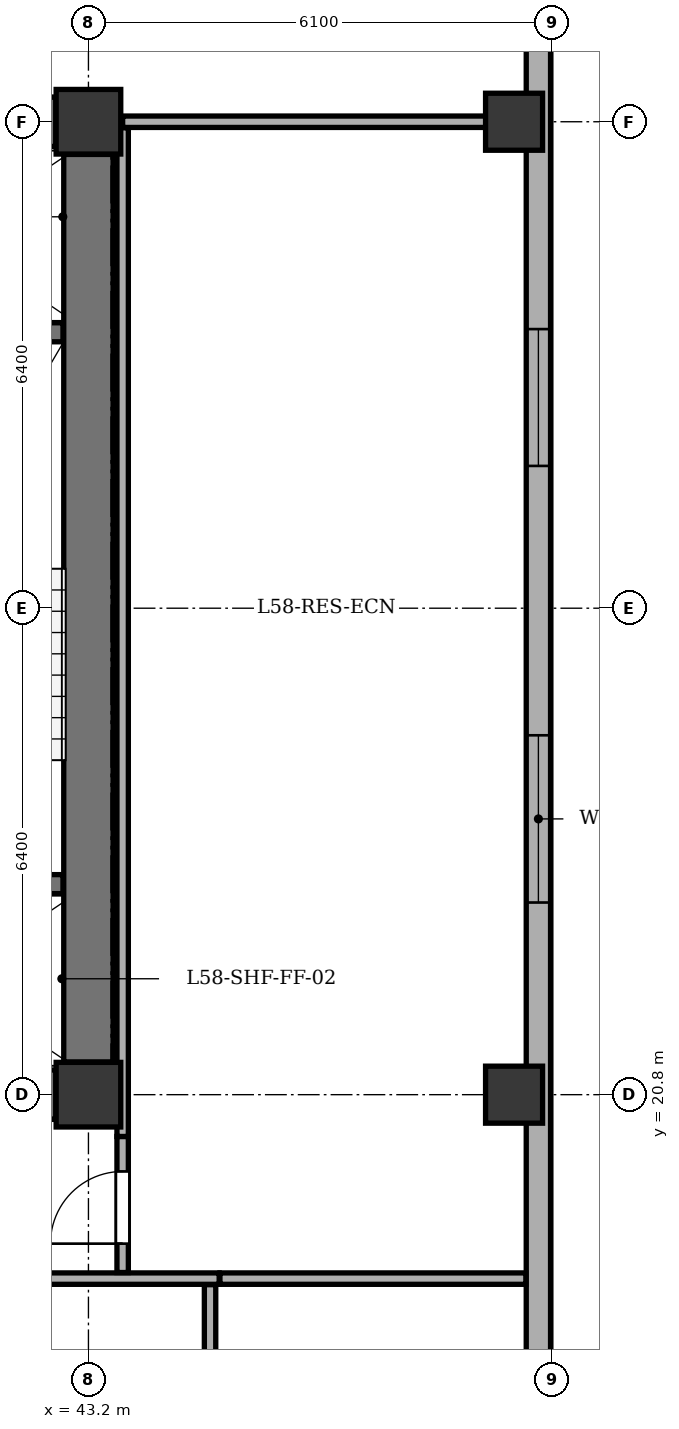
"""IFC4 building model, lengths in metres.
Left out: names, types, materials, properties, quantities, classifications, styles, units other than length and angle.
Written with IfcOpenShell. Run it as: python <this file> out.ifc"""

import sys

from ifc_helpers import new_model, si_unit, direction, frame, frame_2d, origin, origin_2d, place, context, subcontext, project, spatial, rectangle, extrude, element, fill, save


model = new_model("IFC4")
c1 = context("Model", 3, precision=1e-05, world=origin(), true_north=direction((0.0, 1.0)))
c2 = subcontext(c1, "Body", "Model", "MODEL_VIEW")
j1 = project(units=[si_unit("LENGTHUNIT", "METRE"), si_unit("PLANEANGLEUNIT", "RADIAN")], contexts=[c1])
p1 = place(None, origin())
s1 = spatial("IfcSite", under=j1, at=p1, CompositionType="ELEMENT")
p2 = place(p1, origin())
s2 = spatial("IfcBuilding", under=s1, at=p2, CompositionType="ELEMENT")
p3 = place(p2, frame((0.0, 0.0, 224.5)))
s3 = spatial("IfcBuildingStorey", under=s2, at=p3, CompositionType="ELEMENT", Elevation=224.5)
for number, where, z_axis, x_axis in (
    (1, (43.2, 20.8, 0.0), (0.0, 0.0, 1.0), (1.0, 0.0, 0.0)),
    (2, (43.2, 33.6, 0.0), (0.0, 0.0, 1.0), (1.0, 0.0, 0.0)),
):
    element("IfcColumn", number, at=place(p3, frame(where, z_axis=z_axis, x_axis=x_axis)), inside=s3, PredefinedType="COLUMN", context=c2, shape_type="SweptSolid", body=[
        extrude(rectangle(XDim=0.85, YDim=0.85, at=origin_2d()), origin(), (0.0, 0.0, 1.0), 3.4),
    ])
for number, where, z_axis, x_axis in (
    (3, (48.8, 20.8, 0.0), (0.0, 0.0, 1.0), (1.0, 0.0, 0.0)),
    (4, (48.8, 33.6, 0.0), (0.0, 0.0, 1.0), (1.0, 0.0, 0.0)),
):
    element("IfcColumn", number, at=place(p3, frame(where, z_axis=z_axis, x_axis=x_axis)), inside=s3, PredefinedType="COLUMN", context=c2, shape_type="SweptSolid", body=[
        extrude(rectangle(XDim=0.75, YDim=0.75, at=origin_2d()), origin(), (0.0, 0.0, 1.0), 3.4),
    ])
p4 = place(p3, frame((49.12, 35.0, 0.0), z_axis=(0.0, 0.0, 1.0), x_axis=(0.0, -1.0, 0.0)))
e5 = element("IfcWall", 5, at=p4, inside=s3, PredefinedType="STANDARD", context=c2, shape_type="SweptSolid", body=[
    extrude(rectangle(XDim=27.8, YDim=0.32, at=frame_2d((13.9, 0.0))), origin(), (0.0, 0.0, 1.0), 2.335),
])
p5 = place(p4, frame((4.128, 0.0, 0.75)))
e6 = element("IfcOpeningElement", 6, at=p5, cuts=e5, PredefinedType="OPENING", context=c2, shape_type="SweptSolid", body=[
    extrude(rectangle(XDim=1.8, YDim=1.465, at=frame_2d((0.9, 0.732))), frame((0.0, 0.17, 0.0), z_axis=(0.0, -1.0, 0.0), x_axis=(1.0, 0.0, 0.0)), (0.0, 0.0, 1.0), 0.34),
])
p6 = place(p4, frame((9.472, 0.0, 0.75)))
e7 = element("IfcOpeningElement", 7, at=p6, cuts=e5, PredefinedType="OPENING", context=c2, shape_type="SweptSolid", body=[
    extrude(rectangle(XDim=2.2, YDim=1.465, at=frame_2d((1.1, 0.732))), frame((0.0, 0.17, 0.0), z_axis=(0.0, -1.0, 0.0), x_axis=(1.0, 0.0, 0.0)), (0.0, 0.0, 1.0), 0.34),
])
p7 = place(p4, frame((18.815, 0.0, 0.75)))
e8 = element("IfcOpeningElement", 8, at=p7, cuts=e5, PredefinedType="OPENING", context=c2, shape_type="SweptSolid", body=[
    extrude(rectangle(XDim=1.8, YDim=1.465, at=frame_2d((0.9, 0.732))), frame((0.0, 0.17, 0.0), z_axis=(0.0, -1.0, 0.0), x_axis=(1.0, 0.0, 0.0)), (0.0, 0.0, 1.0), 0.34),
])
p8 = place(p4, frame((23.405, 0.0, 0.75)))
e9 = element("IfcOpeningElement", 9, at=p8, cuts=e5, PredefinedType="OPENING", context=c2, shape_type="SweptSolid", body=[
    extrude(rectangle(XDim=2.2, YDim=1.465, at=frame_2d((1.1, 0.732))), frame((0.0, 0.17, 0.0), z_axis=(0.0, -1.0, 0.0), x_axis=(1.0, 0.0, 0.0)), (0.0, 0.0, 1.0), 0.34),
])
p9 = place(p3, frame((43.2, 21.23, 0.0), z_axis=(0.0, 0.0, 1.0), x_axis=(0.0, 1.0, 0.0)))
e10 = element("IfcWall", 10, at=p9, inside=s3, PredefinedType="SHEAR", context=c2, shape_type="SweptSolid", body=[
    extrude(rectangle(XDim=11.94, YDim=0.65, at=frame_2d((5.97, 0.0))), origin(), (0.0, 0.0, 1.0), 2.95),
])
p10 = place(p3, frame((35.63, 20.8, 0.0), z_axis=(0.0, 0.0, 1.0), x_axis=(1.0, 0.0, 0.0)))
e11 = element("IfcWall", 11, at=p10, inside=s3, PredefinedType="SHEAR", context=c2, shape_type="SweptSolid", body=[
    extrude(rectangle(XDim=7.14, YDim=0.65, at=frame_2d((3.57, 0.0))), origin(), (0.0, 0.0, 1.0), 2.95),
])
p11 = place(p3, frame((35.63, 33.6, 0.0), z_axis=(0.0, 0.0, 1.0), x_axis=(1.0, 0.0, 0.0)))
e12 = element("IfcWall", 12, at=p11, inside=s3, PredefinedType="SHEAR", context=c2, shape_type="SweptSolid", body=[
    extrude(rectangle(XDim=7.14, YDim=0.65, at=frame_2d((3.57, 0.0))), origin(), (0.0, 0.0, 1.0), 2.95),
])
p12 = place(p11, frame((4.77, 0.0, 0.0)))
e13 = element("IfcOpeningElement", 13, at=p12, cuts=e12, PredefinedType="OPENING", context=c2, shape_type="SweptSolid", body=[
    extrude(rectangle(XDim=1.3, YDim=2.15, at=frame_2d((0.65, 1.075))), frame((0.0, 0.335, 0.0), z_axis=(0.0, -1.0, 0.0), x_axis=(1.0, 0.0, 0.0)), (0.0, 0.0, 1.0), 0.67),
])
p13 = place(p11, frame((2.57, 0.0, 0.0)))
e14 = element("IfcOpeningElement", 14, at=p13, cuts=e12, PredefinedType="OPENING", context=c2, shape_type="SweptSolid", body=[
    extrude(rectangle(XDim=0.85, YDim=2.02, at=frame_2d((0.425, 1.01))), frame((0.0, 0.335, 0.0), z_axis=(0.0, -1.0, 0.0), x_axis=(1.0, 0.0, 0.0)), (0.0, 0.0, 1.0), 0.67),
])
for number, where, z_axis, x_axis in (
    (15, (39.69, 23.57, 0.0), (0.0, 0.0, 1.0), (1.0, 0.0, 0.0)),
    (16, (39.69, 30.83, 0.0), (0.0, 0.0, 1.0), (1.0, 0.0, 0.0)),
):
    element("IfcWall", number, at=place(p3, frame(where, z_axis=z_axis, x_axis=x_axis)), inside=s3, PredefinedType="SHEAR", context=c2, shape_type="SweptSolid", body=[
        extrude(rectangle(XDim=3.175, YDim=0.25, at=frame_2d((1.587, 0.0))), origin(), (0.0, 0.0, 1.0), 2.95),
    ])
p14 = place(p3, frame((10.9, 18.38, 0.0), z_axis=(0.0, 0.0, 1.0), x_axis=(1.0, 0.0, 0.0)))
e17 = element("IfcWall", 17, at=p14, inside=s3, PredefinedType="PARTITIONING", context=c2, shape_type="SweptSolid", body=[
    extrude(rectangle(XDim=34.02, YDim=0.15, at=frame_2d((17.01, 0.0))), origin(), (0.0, 0.0, 1.0), 2.95),
])
p15 = place(p14, frame((2.774, 0.0, 0.0)))
e18 = element("IfcOpeningElement", 18, at=p15, cuts=e17, PredefinedType="OPENING", context=c2, shape_type="SweptSolid", body=[
    extrude(rectangle(XDim=1.0, YDim=2.1, at=frame_2d((0.5, 1.05))), frame((0.0, 0.085, 0.0), z_axis=(0.0, -1.0, 0.0), x_axis=(1.0, 0.0, 0.0)), (0.0, 0.0, 1.0), 0.17),
])
p16 = place(p14, frame((12.118, 0.0, 0.0)))
e19 = element("IfcOpeningElement", 19, at=p16, cuts=e17, PredefinedType="OPENING", context=c2, shape_type="SweptSolid", body=[
    extrude(rectangle(XDim=1.0, YDim=2.1, at=frame_2d((0.5, 1.05))), frame((0.0, 0.085, 0.0), z_axis=(0.0, -1.0, 0.0), x_axis=(1.0, 0.0, 0.0)), (0.0, 0.0, 1.0), 0.17),
])
p17 = place(p14, frame((20.901, 0.0, 0.0)))
e20 = element("IfcOpeningElement", 20, at=p17, cuts=e17, PredefinedType="OPENING", context=c2, shape_type="SweptSolid", body=[
    extrude(rectangle(XDim=1.0, YDim=2.1, at=frame_2d((0.5, 1.05))), frame((0.0, 0.085, 0.0), z_axis=(0.0, -1.0, 0.0), x_axis=(1.0, 0.0, 0.0)), (0.0, 0.0, 1.0), 0.17),
])
p18 = place(p14, frame((29.346, 0.0, 0.0)))
e21 = element("IfcOpeningElement", 21, at=p18, cuts=e17, PredefinedType="OPENING", context=c2, shape_type="SweptSolid", body=[
    extrude(rectangle(XDim=1.0, YDim=2.1, at=frame_2d((0.5, 1.05))), frame((0.0, 0.085, 0.0), z_axis=(0.0, -1.0, 0.0), x_axis=(1.0, 0.0, 0.0)), (0.0, 0.0, 1.0), 0.17),
])
p19 = place(p3, frame((44.8, 3.045, 0.0), z_axis=(0.0, 0.0, 1.0), x_axis=(0.0, 1.0, 0.0)))
e22 = element("IfcWall", 22, at=p19, inside=s3, PredefinedType="PARTITIONING", context=c2, shape_type="SweptSolid", body=[
    extrude(rectangle(XDim=15.255, YDim=0.15, at=frame_2d((7.627, 0.0))), origin(), (0.0, 0.0, 1.0), 2.385),
])
p20 = place(p3, frame((44.93, 18.38, 0.0), z_axis=(0.0, 0.0, 1.0), x_axis=(1.0, 0.0, 0.0)))
e23 = element("IfcWall", 23, at=p20, inside=s3, PredefinedType="PARTITIONING", context=c2, shape_type="SweptSolid", body=[
    extrude(rectangle(XDim=4.025, YDim=0.15, at=frame_2d((2.013, 0.0))), origin(), (0.0, 0.0, 1.0), 2.95),
])
p21 = place(p3, frame((43.65, 33.6, 0.0), z_axis=(0.0, 0.0, 1.0), x_axis=(1.0, 0.0, 0.0)))
e24 = element("IfcWall", 24, at=p21, inside=s3, PredefinedType="PARTITIONING", context=c2, shape_type="SweptSolid", body=[
    extrude(rectangle(XDim=5.305, YDim=0.15, at=frame_2d((2.653, 0.0))), origin(), (0.0, 0.0, 1.0), 2.135),
])
p22 = place(p3, frame((43.65, 18.46, 0.0), z_axis=(0.0, 0.0, 1.0), x_axis=(0.0, 1.0, 0.0)))
e25 = element("IfcWall", 25, at=p22, inside=s3, PredefinedType="PARTITIONING", context=c2, shape_type="SweptSolid", body=[
    extrude(rectangle(XDim=1.79, YDim=0.15, at=frame_2d((0.895, 0.0))), origin(), (0.0, 0.0, 1.0), 2.95),
])
p23 = place(p22, frame((0.38, 0.0, 0.0)))
e26 = element("IfcOpeningElement", 26, at=p23, cuts=e25, PredefinedType="OPENING", context=c2, shape_type="SweptSolid", body=[
    extrude(rectangle(XDim=0.95, YDim=2.1, at=frame_2d((0.475, 1.05))), frame((0.0, 0.085, 0.0), z_axis=(0.0, -1.0, 0.0), x_axis=(1.0, 0.0, 0.0)), (0.0, 0.0, 1.0), 0.17),
])
p24 = place(p3, frame((43.65, 20.25, 0.0), z_axis=(0.0, 0.0, 1.0), x_axis=(0.0, 1.0, 0.0)))
e27 = element("IfcWall", 27, at=p24, inside=s3, PredefinedType="PARTITIONING", context=c2, shape_type="SweptSolid", body=[
    extrude(rectangle(XDim=13.27, YDim=0.15, at=frame_2d((6.635, 0.0))), origin(), (0.0, 0.0, 1.0), 2.95),
])
p25 = place(p5, origin())
e28 = element("IfcWindow", 28, at=p25, inside=s3, PartitioningType="SINGLE_PANEL", PredefinedType="WINDOW", context=c2, shape_type="SweptSolid", body=[
    extrude(rectangle(XDim=1.8, YDim=1.465, at=frame_2d((0.9, 0.732))), frame((0.0, -0.01, 0.0), z_axis=(0.0, -1.0, 0.0), x_axis=(1.0, 0.0, 0.0)), (0.0, 0.0, 1.0), 0.06),
])
fill(e6, e28)
p26 = place(p6, origin())
e29 = element("IfcWindow", 29, at=p26, inside=s3, PartitioningType="SINGLE_PANEL", PredefinedType="WINDOW", context=c2, shape_type="SweptSolid", body=[
    extrude(rectangle(XDim=2.2, YDim=1.465, at=frame_2d((1.1, 0.732))), frame((0.0, -0.01, 0.0), z_axis=(0.0, -1.0, 0.0), x_axis=(1.0, 0.0, 0.0)), (0.0, 0.0, 1.0), 0.06),
])
fill(e7, e29)
p27 = place(p23, origin())
e30 = element("IfcDoor", 30, at=p27, inside=s3, OperationType="SINGLE_SWING_LEFT", PredefinedType="DOOR", context=c2, shape_type="SweptSolid", body=[
    extrude(rectangle(XDim=0.95, YDim=2.1, at=frame_2d((0.475, 1.05))), frame((0.0, 0.025, 0.0), z_axis=(0.0, -1.0, 0.0), x_axis=(1.0, 0.0, 0.0)), (0.0, 0.0, 1.0), 0.05),
])
fill(e26, e30)
save(model, sys.argv[1])
